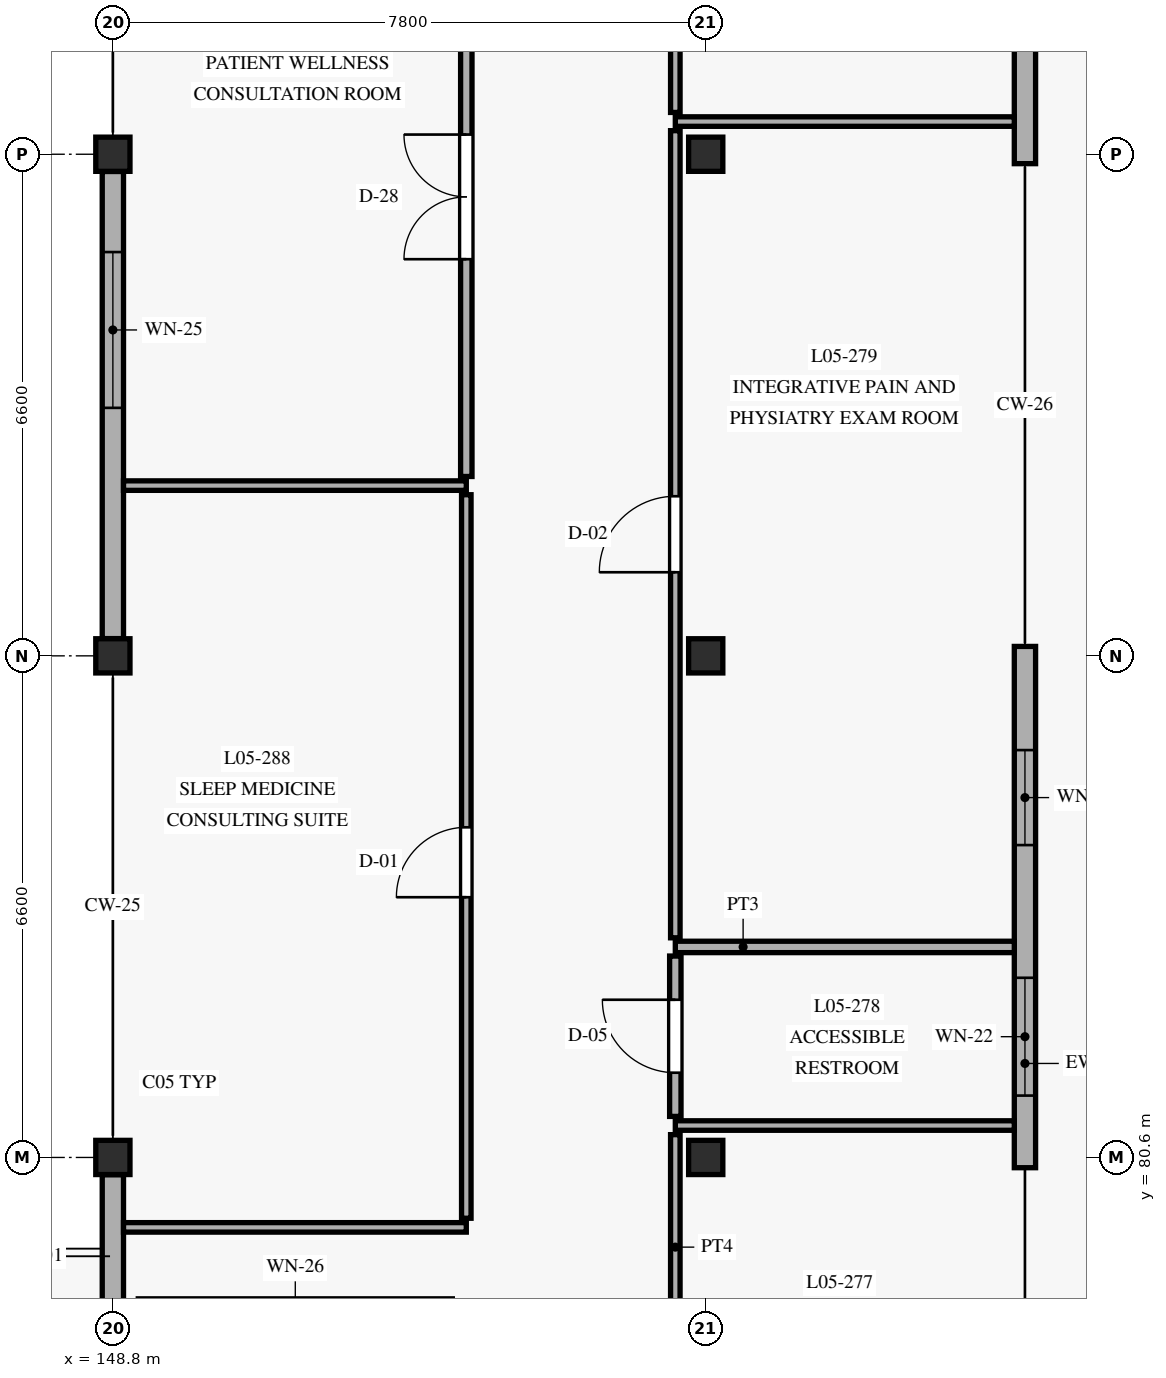
"""IFC4 building model, lengths in metres.
Left out: names, types, materials, properties, quantities, classifications, styles, units other than length and angle.
Written with IfcOpenShell. Run it as: python <this file> out.ifc"""

import sys

from ifc_helpers import new_model, si_unit, direction, frame, frame_2d, origin, origin_with_axes, origin_2d, place, context, subcontext, project, spatial, rectangle, extrude, element, fill, save


model = new_model("IFC4")
c1 = context("Model", 3, precision=1e-05, world=origin(), true_north=direction((0.0, 1.0)))
c2 = subcontext(c1, "Body", "Model", "MODEL_VIEW")
j1 = project(units=[si_unit("LENGTHUNIT", "METRE"), si_unit("PLANEANGLEUNIT", "RADIAN")], contexts=[c1])
p1 = place(None, origin())
s1 = spatial("IfcSite", under=j1, at=p1, CompositionType="ELEMENT")
p2 = place(p1, origin())
s2 = spatial("IfcBuilding", under=s1, at=p2, CompositionType="ELEMENT")
p3 = place(p2, frame((0.0, 0.0, 17.55)))
s3 = spatial("IfcBuildingStorey", under=s2, at=p3, CompositionType="ELEMENT", Elevation=17.55)
for number, where, z_axis, x_axis in (
    (1, (148.8, 80.6, 0.0), (0.0, 0.0, 1.0), (1.0, 0.0, 0.0)),
    (2, (148.8, 87.2, 0.0), (0.0, 0.0, 1.0), (1.0, 0.0, 0.0)),
    (3, (148.8, 93.8, 0.0), (0.0, 0.0, 1.0), (1.0, 0.0, 0.0)),
    (4, (156.6, 80.6, 0.0), (0.0, 0.0, 1.0), (1.0, 0.0, 0.0)),
    (5, (156.6, 87.2, 0.0), (0.0, 0.0, 1.0), (1.0, 0.0, 0.0)),
    (6, (156.6, 93.8, 0.0), (0.0, 0.0, 1.0), (1.0, 0.0, 0.0)),
):
    element("IfcColumn", number, at=place(p3, frame(where, z_axis=z_axis, x_axis=x_axis)), inside=s3, PredefinedType="COLUMN", context=c2, shape_type="SweptSolid", body=[
        extrude(rectangle(XDim=0.45, YDim=0.45, at=origin_2d()), origin(), (0.0, 0.0, 1.0), 4.05),
    ])
p4 = place(p3, frame((160.8, 80.465, 0.0), z_axis=(0.0, 0.0, 1.0), x_axis=(0.0, 1.0, 0.0)))
e7 = element("IfcWall", 7, at=p4, inside=s3, PredefinedType="SOLIDWALL", context=c2, shape_type="SweptSolid", body=[
    extrude(rectangle(XDim=6.859, YDim=0.28, at=frame_2d((3.429, 0.0))), origin(), (0.0, 0.0, 1.0), 3.84),
])
p5 = place(p4, frame((0.949, 0.0, 0.85)))
e8 = element("IfcOpeningElement", 8, at=p5, cuts=e7, PredefinedType="OPENING", context=c2, shape_type="SweptSolid", body=[
    extrude(rectangle(XDim=1.55, YDim=1.75, at=frame_2d((0.775, 0.875))), frame((0.0, 0.15, 0.0), z_axis=(0.0, -1.0, 0.0), x_axis=(1.0, 0.0, 0.0)), (0.0, 0.0, 1.0), 0.3),
])
p6 = place(p4, frame((4.245, 0.0, 0.85)))
e9 = element("IfcOpeningElement", 9, at=p6, cuts=e7, PredefinedType="OPENING", context=c2, shape_type="SweptSolid", body=[
    extrude(rectangle(XDim=1.25, YDim=1.75, at=frame_2d((0.625, 0.875))), frame((0.0, 0.15, 0.0), z_axis=(0.0, -1.0, 0.0), x_axis=(1.0, 0.0, 0.0)), (0.0, 0.0, 1.0), 0.3),
])
p7 = place(p3, frame((160.8, 93.676, 0.0), z_axis=(0.0, 0.0, 1.0), x_axis=(0.0, 1.0, 0.0)))
e10 = element("IfcWall", 10, at=p7, inside=s3, PredefinedType="SOLIDWALL", context=c2, shape_type="SweptSolid", body=[
    extrude(rectangle(XDim=6.848, YDim=0.28, at=frame_2d((3.424, 0.0))), origin(), (0.0, 0.0, 1.0), 3.84),
])
p8 = place(p7, frame((1.508, 0.0, 0.85)))
e11 = element("IfcOpeningElement", 11, at=p8, cuts=e10, PredefinedType="OPENING", context=c2, shape_type="SweptSolid", body=[
    extrude(rectangle(XDim=1.55, YDim=1.75, at=frame_2d((0.775, 0.875))), frame((0.0, 0.15, 0.0), z_axis=(0.0, -1.0, 0.0), x_axis=(1.0, 0.0, 0.0)), (0.0, 0.0, 1.0), 0.3),
])
p9 = place(p7, frame((3.94, 0.0, 0.85)))
e12 = element("IfcOpeningElement", 12, at=p9, cuts=e10, PredefinedType="OPENING", context=c2, shape_type="SweptSolid", body=[
    extrude(rectangle(XDim=1.25, YDim=1.75, at=frame_2d((0.625, 0.875))), frame((0.0, 0.15, 0.0), z_axis=(0.0, -1.0, 0.0), x_axis=(1.0, 0.0, 0.0)), (0.0, 0.0, 1.0), 0.3),
])
p10 = place(p3, frame((148.8, 80.373, 0.0), z_axis=(0.0, 0.0, 1.0), x_axis=(0.0, -1.0, 0.0)))
e13 = element("IfcWall", 13, at=p10, inside=s3, PredefinedType="SOLIDWALL", context=c2, shape_type="SweptSolid", body=[
    extrude(rectangle(XDim=7.946, YDim=0.28, at=frame_2d((3.973, 0.0))), origin(), (0.0, 0.0, 1.0), 3.46),
])
p11 = place(p10, frame((2.948, 0.0, 0.8)))
e14 = element("IfcOpeningElement", 14, at=p11, cuts=e13, PredefinedType="OPENING", context=c2, shape_type="SweptSolid", body=[
    extrude(rectangle(XDim=2.05, YDim=1.95, at=frame_2d((1.025, 0.975))), frame((0.0, 0.15, 0.0), z_axis=(0.0, -1.0, 0.0), x_axis=(1.0, 0.0, 0.0)), (0.0, 0.0, 1.0), 0.3),
])
p12 = place(p3, frame((148.8, 93.573, 0.0), z_axis=(0.0, 0.0, 1.0), x_axis=(0.0, -1.0, 0.0)))
e15 = element("IfcWall", 15, at=p12, inside=s3, PredefinedType="SOLIDWALL", context=c2, shape_type="SweptSolid", body=[
    extrude(rectangle(XDim=6.146, YDim=0.28, at=frame_2d((3.073, 0.0))), origin(), (0.0, 0.0, 1.0), 3.46),
])
p13 = place(p12, frame((1.06, 0.0, 0.8)))
e16 = element("IfcOpeningElement", 16, at=p13, cuts=e15, PredefinedType="OPENING", context=c2, shape_type="SweptSolid", body=[
    extrude(rectangle(XDim=2.05, YDim=1.95, at=frame_2d((1.025, 0.975))), frame((0.0, 0.15, 0.0), z_axis=(0.0, -1.0, 0.0), x_axis=(1.0, 0.0, 0.0)), (0.0, 0.0, 1.0), 0.3),
])
p14 = place(p3, frame((156.2, 73.5, 0.0), z_axis=(0.0, 0.0, 1.0), x_axis=(0.0, 1.0, 0.0)))
e17 = element("IfcWall", 17, at=p14, inside=s3, PredefinedType="PARTITIONING", context=c2, shape_type="SweptSolid", body=[
    extrude(rectangle(XDim=7.4, YDim=0.125, at=frame_2d((3.7, 0.0))), origin(), (0.0, 0.0, 1.0), 3.435),
])
p15 = place(p14, frame((3.173, 0.0, 0.0)))
e18 = element("IfcOpeningElement", 18, at=p15, cuts=e17, PredefinedType="OPENING", context=c2, shape_type="SweptSolid", body=[
    extrude(rectangle(XDim=0.9, YDim=2.12, at=frame_2d((0.45, 1.06))), frame((0.0, 0.073, 0.0), z_axis=(0.0, -1.0, 0.0), x_axis=(1.0, 0.0, 0.0)), (0.0, 0.0, 1.0), 0.145),
])
p16 = place(p3, frame((156.2, 81.02, 0.0), z_axis=(0.0, 0.0, 1.0), x_axis=(1.0, 0.0, 0.0)))
e19 = element("IfcWall", 19, at=p16, inside=s3, PredefinedType="PARTITIONING", context=c2, shape_type="SweptSolid", body=[
    extrude(rectangle(XDim=4.46, YDim=0.125, at=frame_2d((2.23, 0.0))), origin(), (0.0, 0.0, 1.0), 3.455),
])
p17 = place(p3, frame((156.2, 81.14, 0.0), z_axis=(0.0, 0.0, 1.0), x_axis=(0.0, 1.0, 0.0)))
e20 = element("IfcWall", 20, at=p17, inside=s3, PredefinedType="PARTITIONING", context=c2, shape_type="SweptSolid", body=[
    extrude(rectangle(XDim=2.11, YDim=0.15, at=frame_2d((1.055, 0.0))), origin(), (0.0, 0.0, 1.0), 3.835),
])
p18 = place(p17, frame((0.575, 0.0, 0.0)))
e21 = element("IfcOpeningElement", 21, at=p18, cuts=e20, PredefinedType="OPENING", context=c2, shape_type="SweptSolid", body=[
    extrude(rectangle(XDim=0.96, YDim=2.1, at=frame_2d((0.48, 1.05))), frame((0.0, 0.085, 0.0), z_axis=(0.0, -1.0, 0.0), x_axis=(1.0, 0.0, 0.0)), (0.0, 0.0, 1.0), 0.17),
])
p19 = place(p3, frame((156.2, 83.37, 0.0), z_axis=(0.0, 0.0, 1.0), x_axis=(1.0, 0.0, 0.0)))
e22 = element("IfcWall", 22, at=p19, inside=s3, PredefinedType="PARTITIONING", context=c2, shape_type="SweptSolid", body=[
    extrude(rectangle(XDim=4.46, YDim=0.15, at=frame_2d((2.23, 0.0))), origin(), (0.0, 0.0, 1.0), 3.455),
])
p20 = place(p3, frame((156.2, 83.49, 0.0), z_axis=(0.0, 0.0, 1.0), x_axis=(0.0, 1.0, 0.0)))
e23 = element("IfcWall", 23, at=p20, inside=s3, PredefinedType="PARTITIONING", context=c2, shape_type="SweptSolid", body=[
    extrude(rectangle(XDim=10.62, YDim=0.125, at=frame_2d((5.31, 0.0))), origin(), (0.0, 0.0, 1.0), 3.435),
])
p21 = place(p20, frame((4.81, 0.0, 0.0)))
e24 = element("IfcOpeningElement", 24, at=p21, cuts=e23, PredefinedType="OPENING", context=c2, shape_type="SweptSolid", body=[
    extrude(rectangle(XDim=1.0, YDim=2.15, at=frame_2d((0.5, 1.075))), frame((0.0, 0.073, 0.0), z_axis=(0.0, -1.0, 0.0), x_axis=(1.0, 0.0, 0.0)), (0.0, 0.0, 1.0), 0.145),
])
p22 = place(p3, frame((156.2, 94.23, 0.0), z_axis=(0.0, 0.0, 1.0), x_axis=(1.0, 0.0, 0.0)))
e25 = element("IfcWall", 25, at=p22, inside=s3, PredefinedType="PARTITIONING", context=c2, shape_type="SweptSolid", body=[
    extrude(rectangle(XDim=4.46, YDim=0.125, at=frame_2d((2.23, 0.0))), origin(), (0.0, 0.0, 1.0), 3.455),
])
p23 = place(p3, frame((156.2, 94.35, 0.0), z_axis=(0.0, 0.0, 1.0), x_axis=(0.0, 1.0, 0.0)))
e26 = element("IfcWall", 26, at=p23, inside=s3, PredefinedType="PARTITIONING", context=c2, shape_type="SweptSolid", body=[
    extrude(rectangle(XDim=8.41, YDim=0.125, at=frame_2d((4.205, 0.0))), origin(), (0.0, 0.0, 1.0), 3.435),
])
p24 = place(p23, frame((3.755, 0.0, 0.0)))
e27 = element("IfcOpeningElement", 27, at=p24, cuts=e26, PredefinedType="OPENING", context=c2, shape_type="SweptSolid", body=[
    extrude(rectangle(XDim=0.9, YDim=2.12, at=frame_2d((0.45, 1.06))), frame((0.0, 0.073, 0.0), z_axis=(0.0, -1.0, 0.0), x_axis=(1.0, 0.0, 0.0)), (0.0, 0.0, 1.0), 0.145),
])
p25 = place(p3, frame((153.45, 79.8, 0.0), z_axis=(0.0, 0.0, 1.0), x_axis=(0.0, 1.0, 0.0)))
e28 = element("IfcWall", 28, at=p25, inside=s3, PredefinedType="PARTITIONING", context=c2, shape_type="SweptSolid", body=[
    extrude(rectangle(XDim=9.52, YDim=0.125, at=frame_2d((4.76, 0.0))), origin(), (0.0, 0.0, 1.0), 3.435),
])
p26 = place(p25, frame((4.224, 0.0, 0.0)))
e29 = element("IfcOpeningElement", 29, at=p26, cuts=e28, PredefinedType="OPENING", context=c2, shape_type="SweptSolid", body=[
    extrude(rectangle(XDim=0.92, YDim=2.15, at=frame_2d((0.46, 1.075))), frame((0.0, 0.073, 0.0), z_axis=(0.0, -1.0, 0.0), x_axis=(1.0, 0.0, 0.0)), (0.0, 0.0, 1.0), 0.145),
])
for number, where, z_axis, x_axis in (
    (30, (148.94, 79.68, 0.0), (0.0, 0.0, 1.0), (1.0, 0.0, 0.0)),
    (31, (148.94, 89.44, 0.0), (0.0, 0.0, 1.0), (1.0, 0.0, 0.0)),
):
    element("IfcWall", number, at=place(p3, frame(where, z_axis=z_axis, x_axis=x_axis)), inside=s3, PredefinedType="PARTITIONING", context=c2, shape_type="SweptSolid", body=[
        extrude(rectangle(XDim=4.51, YDim=0.125, at=frame_2d((2.255, 0.0))), origin(), (0.0, 0.0, 1.0), 3.455),
    ])
p27 = place(p3, frame((153.45, 89.56, 0.0), z_axis=(0.0, 0.0, 1.0), x_axis=(0.0, 1.0, 0.0)))
e32 = element("IfcWall", 32, at=p27, inside=s3, PredefinedType="PARTITIONING", context=c2, shape_type="SweptSolid", body=[
    extrude(rectangle(XDim=7.51, YDim=0.15, at=frame_2d((3.755, 0.0))), origin(), (0.0, 0.0, 1.0), 3.435),
])
p28 = place(p27, frame((2.859, 0.0, 0.0)))
e33 = element("IfcOpeningElement", 33, at=p28, cuts=e32, PredefinedType="OPENING", context=c2, shape_type="SweptSolid", body=[
    extrude(rectangle(XDim=1.64, YDim=2.32, at=frame_2d((0.82, 1.16))), frame((0.0, 0.085, 0.0), z_axis=(0.0, -1.0, 0.0), x_axis=(1.0, 0.0, 0.0)), (0.0, 0.0, 1.0), 0.17),
])
p29 = place(p5, origin_with_axes())
e34 = element("IfcWindow", 34, at=p29, inside=s3, PartitioningType="SINGLE_PANEL", PredefinedType="WINDOW", context=c2, shape_type="SweptSolid", body=[
    extrude(rectangle(XDim=1.55, YDim=1.75, at=frame_2d((0.775, 0.875))), frame((0.0, 0.03, 0.0), z_axis=(0.0, -1.0, 0.0), x_axis=(1.0, 0.0, 0.0)), (0.0, 0.0, 1.0), 0.06),
])
fill(e8, e34)
p30 = place(p6, origin_with_axes())
e35 = element("IfcWindow", 35, at=p30, inside=s3, PartitioningType="SINGLE_PANEL", PredefinedType="WINDOW", context=c2, shape_type="SweptSolid", body=[
    extrude(rectangle(XDim=1.25, YDim=1.75, at=frame_2d((0.625, 0.875))), frame((0.0, 0.03, 0.0), z_axis=(0.0, -1.0, 0.0), x_axis=(1.0, 0.0, 0.0)), (0.0, 0.0, 1.0), 0.06),
])
fill(e9, e35)
p31 = place(p13, origin_with_axes())
e36 = element("IfcWindow", 36, at=p31, inside=s3, PartitioningType="SINGLE_PANEL", PredefinedType="WINDOW", context=c2, shape_type="SweptSolid", body=[
    extrude(rectangle(XDim=2.05, YDim=1.95, at=frame_2d((1.025, 0.975))), frame((0.0, 0.03, 0.0), z_axis=(0.0, -1.0, 0.0), x_axis=(1.0, 0.0, 0.0)), (0.0, 0.0, 1.0), 0.06),
])
fill(e16, e36)
p32 = place(p18, frame((0.96, 0.0, 0.0), z_axis=(0.0, 0.0, 1.0), x_axis=(-1.0, 0.0, 0.0)))
e37 = element("IfcDoor", 37, at=p32, inside=s3, OperationType="SINGLE_SWING_LEFT", PredefinedType="DOOR", context=c2, shape_type="SweptSolid", body=[
    extrude(rectangle(XDim=0.96, YDim=2.1, at=frame_2d((0.48, 1.05))), frame((0.0, 0.025, 0.0), z_axis=(0.0, -1.0, 0.0), x_axis=(1.0, 0.0, 0.0)), (0.0, 0.0, 1.0), 0.05),
])
fill(e21, e37)
p33 = place(p21, frame((1.0, 0.0, 0.0), z_axis=(0.0, 0.0, 1.0), x_axis=(-1.0, 0.0, 0.0)))
e38 = element("IfcDoor", 38, at=p33, inside=s3, OperationType="SINGLE_SWING_RIGHT", PredefinedType="DOOR", context=c2, shape_type="SweptSolid", body=[
    extrude(rectangle(XDim=1.0, YDim=2.15, at=frame_2d((0.5, 1.075))), frame((0.0, 0.025, 0.0), z_axis=(0.0, -1.0, 0.0), x_axis=(1.0, 0.0, 0.0)), (0.0, 0.0, 1.0), 0.05),
])
fill(e24, e38)
p34 = place(p26, origin_with_axes())
e39 = element("IfcDoor", 39, at=p34, inside=s3, OperationType="SINGLE_SWING_LEFT", PredefinedType="DOOR", context=c2, shape_type="SweptSolid", body=[
    extrude(rectangle(XDim=0.92, YDim=2.15, at=frame_2d((0.46, 1.075))), frame((0.0, 0.025, 0.0), z_axis=(0.0, -1.0, 0.0), x_axis=(1.0, 0.0, 0.0)), (0.0, 0.0, 1.0), 0.05),
])
fill(e29, e39)
p35 = place(p28, origin_with_axes())
e40 = element("IfcDoor", 40, at=p35, inside=s3, OperationType="DOUBLE_DOOR_SINGLE_SWING", PredefinedType="DOOR", context=c2, shape_type="SweptSolid", body=[
    extrude(rectangle(XDim=1.64, YDim=2.32, at=frame_2d((0.82, 1.16))), frame((0.0, 0.025, 0.0), z_axis=(0.0, -1.0, 0.0), x_axis=(1.0, 0.0, 0.0)), (0.0, 0.0, 1.0), 0.05),
])
fill(e33, e40)
save(model, sys.argv[1])
